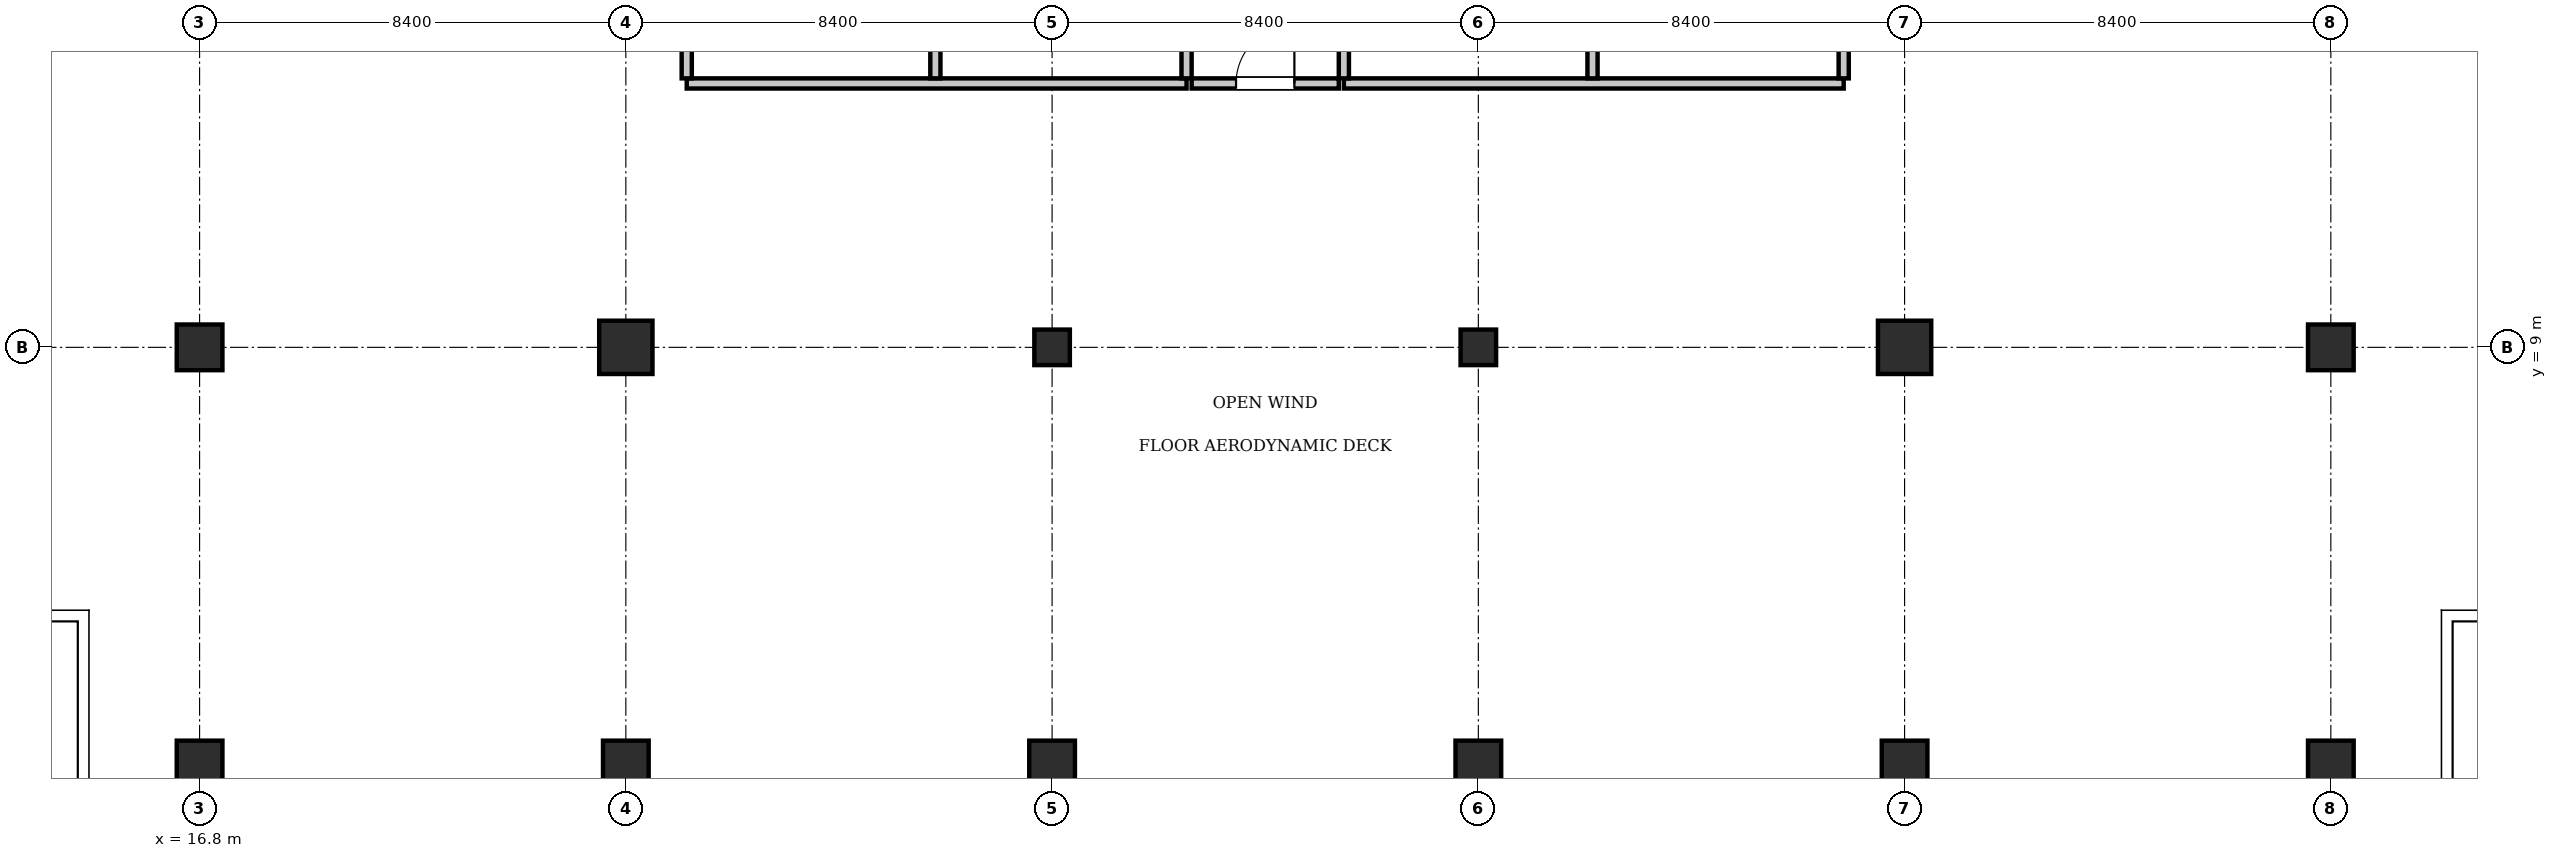
"""IFC4 building model, lengths in metres.
Left out: names, types, materials, properties, quantities, classifications, styles, units other than length and angle.
Written with IfcOpenShell. Run it as: python <this file> out.ifc"""

import sys

from ifc_helpers import new_model, si_unit, direction, frame, frame_2d, origin, origin_2d, place, context, subcontext, project, spatial, rectangle, i_section, extrude, element, fill, save


model = new_model("IFC4")
c1 = context("Model", 3, precision=1e-05, world=origin(), true_north=direction((0.0, 1.0)))
c2 = subcontext(c1, "Body", "Model", "MODEL_VIEW")
j1 = project(units=[si_unit("LENGTHUNIT", "METRE"), si_unit("PLANEANGLEUNIT", "RADIAN")], contexts=[c1])
p1 = place(None, origin())
s1 = spatial("IfcSite", under=j1, at=p1, CompositionType="ELEMENT")
p2 = place(p1, origin())
s2 = spatial("IfcBuilding", under=s1, at=p2, CompositionType="ELEMENT")
p3 = place(p2, frame((0.0, 0.0, 115.5)))
s3 = spatial("IfcBuildingStorey", under=s2, at=p3, CompositionType="ELEMENT", Elevation=115.5)
for number, where, z_axis, x_axis in (
    (1, (25.2, 9.0, 0.0), (0.0, 0.0, 1.0), (1.0, 0.0, 0.0)),
    (2, (50.4, 9.0, 0.0), (0.0, 0.0, 1.0), (1.0, 0.0, 0.0)),
):
    element("IfcColumn", number, at=place(p3, frame(where, z_axis=z_axis, x_axis=x_axis)), inside=s3, PredefinedType="COLUMN", context=c2, shape_type="SweptSolid", body=[
        extrude(rectangle(XDim=1.05, YDim=1.05, at=origin_2d()), origin(), (0.0, 0.0, 1.0), 7.0),
    ])
for number, where, z_axis, x_axis in (
    (3, (33.6, 9.0, 0.0), (0.0, 0.0, 1.0), (1.0, 0.0, 0.0)),
    (4, (42.0, 9.0, 0.0), (0.0, 0.0, 1.0), (1.0, 0.0, 0.0)),
):
    element("IfcColumn", number, at=place(p3, frame(where, z_axis=z_axis, x_axis=x_axis)), inside=s3, PredefinedType="COLUMN", context=c2, shape_type="SweptSolid", body=[
        extrude(i_section(OverallWidth=0.7, OverallDepth=0.7, WebThickness=0.028, FlangeThickness=0.044, at=origin_2d()), origin(), (0.0, 0.0, 1.0), 7.0),
    ])
for number, where, z_axis, x_axis in (
    (5, (16.8, 9.0, 0.0), (0.0, 0.0, 1.0), (1.0, 0.0, 0.0)),
    (6, (58.8, 9.0, 0.0), (0.0, 0.0, 1.0), (1.0, 0.0, 0.0)),
    (7, (16.8, 0.8, 0.0), (0.0, 0.0, 1.0), (1.0, 0.0, 0.0)),
    (8, (25.2, 0.8, 0.0), (0.0, 0.0, 1.0), (1.0, 0.0, 0.0)),
    (9, (33.6, 0.8, 0.0), (0.0, 0.0, 1.0), (1.0, 0.0, 0.0)),
    (10, (42.0, 0.8, 0.0), (0.0, 0.0, 1.0), (1.0, 0.0, 0.0)),
    (11, (50.4, 0.8, 0.0), (0.0, 0.0, 1.0), (1.0, 0.0, 0.0)),
    (12, (58.8, 0.8, 0.0), (0.0, 0.0, 1.0), (1.0, 0.0, 0.0)),
):
    element("IfcColumn", number, at=place(p3, frame(where, z_axis=z_axis, x_axis=x_axis)), inside=s3, PredefinedType="COLUMN", context=c2, shape_type="SweptSolid", body=[
        extrude(rectangle(XDim=0.9, YDim=0.9, at=origin_2d()), origin(), (0.0, 0.0, 1.0), 7.0),
    ])
p4 = place(p3, frame((26.4, 14.2, 0.0), z_axis=(0.0, 0.0, 1.0), x_axis=(1.0, 0.0, 0.0)))
e13 = element("IfcWall", 13, at=p4, inside=s3, PredefinedType="PARTITIONING", context=c2, shape_type="SweptSolid", body=[
    extrude(rectangle(XDim=9.85, YDim=0.2, at=frame_2d((4.925, 0.0))), origin(), (0.0, 0.0, 1.0), 6.76),
])
p5 = place(p3, frame((26.4, 14.3, 0.0), z_axis=(0.0, 0.0, 1.0), x_axis=(0.0, 1.0, 0.0)))
e14 = element("IfcWall", 14, at=p5, inside=s3, PredefinedType="PARTITIONING", context=c2, shape_type="SweptSolid", body=[
    extrude(rectangle(XDim=20.52, YDim=0.2, at=frame_2d((10.26, 0.0))), origin(), (0.0, 0.0, 1.0), 6.76),
])
p6 = place(p3, frame((36.25, 14.3, 0.0), z_axis=(0.0, 0.0, 1.0), x_axis=(0.0, 1.0, 0.0)))
e15 = element("IfcWall", 15, at=p6, inside=s3, PredefinedType="PARTITIONING", context=c2, shape_type="SweptSolid", body=[
    extrude(rectangle(XDim=2.5, YDim=0.2, at=frame_2d((1.25, 0.0))), origin(), (0.0, 0.0, 1.0), 6.76),
])
p7 = place(p6, frame((0.75, 0.0, 0.0)))
e16 = element("IfcOpeningElement", 16, at=p7, cuts=e15, PredefinedType="OPENING", context=c2, shape_type="SweptSolid", body=[
    extrude(rectangle(XDim=0.9, YDim=2.1, at=frame_2d((0.45, 1.05))), frame((0.0, 0.11, 0.0), z_axis=(0.0, -1.0, 0.0), x_axis=(1.0, 0.0, 0.0)), (0.0, 0.0, 1.0), 0.22),
])
p8 = place(p3, frame((31.3, 14.3, 0.0), z_axis=(0.0, 0.0, 1.0), x_axis=(0.0, 1.0, 0.0)))
e17 = element("IfcWall", 17, at=p8, inside=s3, PredefinedType="PARTITIONING", context=c2, shape_type="SweptSolid", body=[
    extrude(rectangle(XDim=2.5, YDim=0.2, at=frame_2d((1.25, 0.0))), origin(), (0.0, 0.0, 1.0), 6.76),
])
p9 = place(p8, frame((0.75, 0.0, 0.0)))
e18 = element("IfcOpeningElement", 18, at=p9, cuts=e17, PredefinedType="OPENING", context=c2, shape_type="SweptSolid", body=[
    extrude(rectangle(XDim=0.9, YDim=2.1, at=frame_2d((0.45, 1.05))), frame((0.0, 0.11, 0.0), z_axis=(0.0, -1.0, 0.0), x_axis=(1.0, 0.0, 0.0)), (0.0, 0.0, 1.0), 0.22),
])
p10 = place(p3, frame((39.35, 14.2, 0.0), z_axis=(0.0, 0.0, 1.0), x_axis=(1.0, 0.0, 0.0)))
e19 = element("IfcWall", 19, at=p10, inside=s3, PredefinedType="PARTITIONING", context=c2, shape_type="SweptSolid", body=[
    extrude(rectangle(XDim=9.85, YDim=0.2, at=frame_2d((4.925, 0.0))), origin(), (0.0, 0.0, 1.0), 6.76),
])
p11 = place(p3, frame((49.2, 14.3, 0.0), z_axis=(0.0, 0.0, 1.0), x_axis=(0.0, 1.0, 0.0)))
e20 = element("IfcWall", 20, at=p11, inside=s3, PredefinedType="PARTITIONING", context=c2, shape_type="SweptSolid", body=[
    extrude(rectangle(XDim=20.52, YDim=0.2, at=frame_2d((10.26, 0.0))), origin(), (0.0, 0.0, 1.0), 6.76),
])
p12 = place(p3, frame((39.35, 14.3, 0.0), z_axis=(0.0, 0.0, 1.0), x_axis=(0.0, 1.0, 0.0)))
e21 = element("IfcWall", 21, at=p12, inside=s3, PredefinedType="PARTITIONING", context=c2, shape_type="SweptSolid", body=[
    extrude(rectangle(XDim=2.5, YDim=0.2, at=frame_2d((1.25, 0.0))), origin(), (0.0, 0.0, 1.0), 6.76),
])
p13 = place(p12, frame((0.75, 0.0, 0.0)))
e22 = element("IfcOpeningElement", 22, at=p13, cuts=e21, PredefinedType="OPENING", context=c2, shape_type="SweptSolid", body=[
    extrude(rectangle(XDim=0.9, YDim=2.1, at=frame_2d((0.45, 1.05))), frame((0.0, 0.11, 0.0), z_axis=(0.0, -1.0, 0.0), x_axis=(1.0, 0.0, 0.0)), (0.0, 0.0, 1.0), 0.22),
])
p14 = place(p3, frame((44.25, 14.3, 0.0), z_axis=(0.0, 0.0, 1.0), x_axis=(0.0, 1.0, 0.0)))
e23 = element("IfcWall", 23, at=p14, inside=s3, PredefinedType="PARTITIONING", context=c2, shape_type="SweptSolid", body=[
    extrude(rectangle(XDim=2.5, YDim=0.2, at=frame_2d((1.25, 0.0))), origin(), (0.0, 0.0, 1.0), 6.76),
])
p15 = place(p14, frame((0.75, 0.0, 0.0)))
e24 = element("IfcOpeningElement", 24, at=p15, cuts=e23, PredefinedType="OPENING", context=c2, shape_type="SweptSolid", body=[
    extrude(rectangle(XDim=0.9, YDim=2.1, at=frame_2d((0.45, 1.05))), frame((0.0, 0.11, 0.0), z_axis=(0.0, -1.0, 0.0), x_axis=(1.0, 0.0, 0.0)), (0.0, 0.0, 1.0), 0.22),
])
p16 = place(p3, frame((36.35, 14.2, 0.0), z_axis=(0.0, 0.0, 1.0), x_axis=(1.0, 0.0, 0.0)))
e25 = element("IfcWall", 25, at=p16, inside=s3, PredefinedType="PARTITIONING", context=c2, shape_type="SweptSolid", body=[
    extrude(rectangle(XDim=2.9, YDim=0.2, at=frame_2d((1.45, 0.0))), origin(), (0.0, 0.0, 1.0), 6.76),
])
p17 = place(p16, frame((0.875, 0.0, 0.0)))
e26 = element("IfcOpeningElement", 26, at=p17, cuts=e25, PredefinedType="OPENING", context=c2, shape_type="SweptSolid", body=[
    extrude(rectangle(XDim=1.15, YDim=2.15, at=frame_2d((0.575, 1.075))), frame((0.0, 0.11, 0.0), z_axis=(0.0, -1.0, 0.0), x_axis=(1.0, 0.0, 0.0)), (0.0, 0.0, 1.0), 0.22),
])
p18 = place(p17, origin())
e27 = element("IfcDoor", 27, at=p18, inside=s3, OperationType="SINGLE_SWING_RIGHT", PredefinedType="DOOR", context=c2, shape_type="SweptSolid", body=[
    extrude(rectangle(XDim=1.15, YDim=2.15, at=frame_2d((0.575, 1.075))), frame((0.0, 0.025, 0.0), z_axis=(0.0, -1.0, 0.0), x_axis=(1.0, 0.0, 0.0)), (0.0, 0.0, 1.0), 0.05),
])
fill(e26, e27)
save(model, sys.argv[1])
